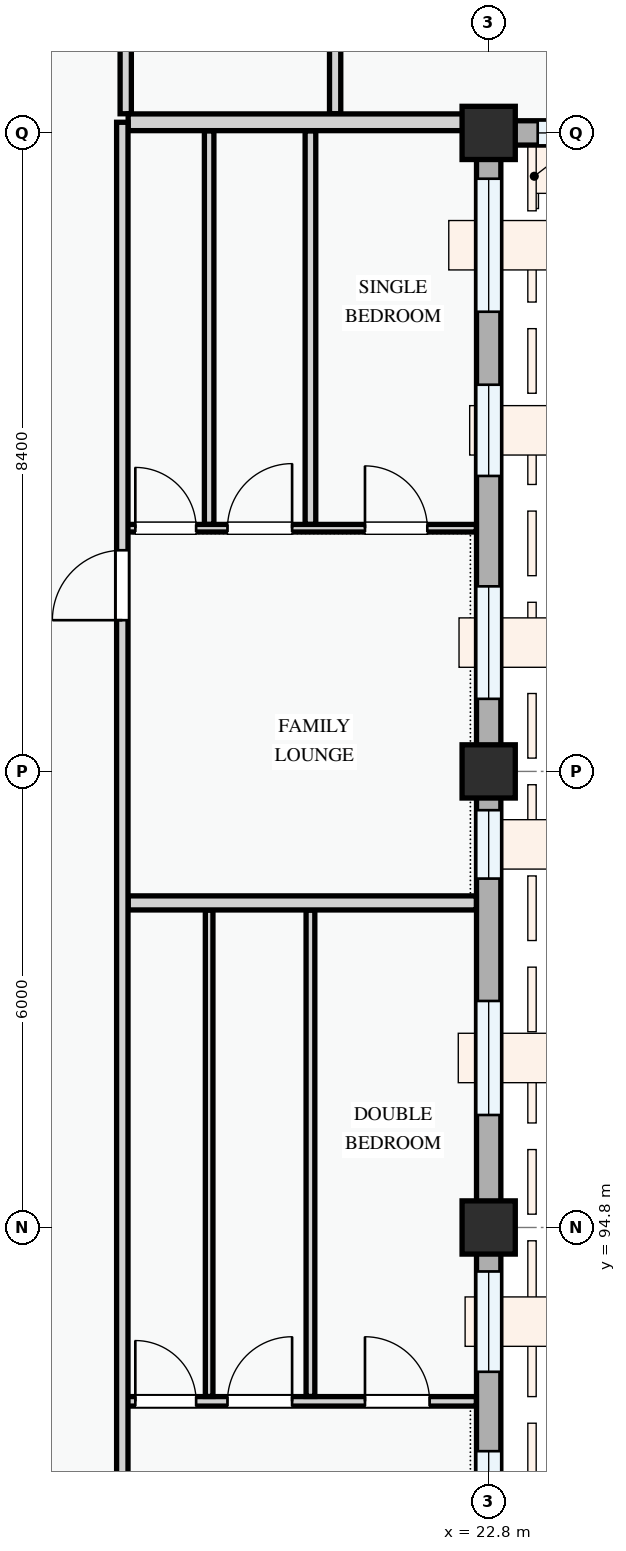
"""IFC4 building model, lengths in metres.
Left out: names, types, materials, properties, quantities, classifications, styles, units other than length and angle.
Written with IfcOpenShell. Run it as: python <this file> out.ifc"""

import sys

from ifc_helpers import new_model, si_unit, direction, frame, frame_2d, origin, origin_2d, place, context, subcontext, project, spatial, rectangle, extrude, element, fill, save


model = new_model("IFC4")
c1 = context("Model", 3, precision=1e-05, world=origin(), true_north=direction((0.0, 1.0)))
c2 = subcontext(c1, "Body", "Model", "MODEL_VIEW")
j1 = project(units=[si_unit("LENGTHUNIT", "METRE"), si_unit("PLANEANGLEUNIT", "RADIAN")], contexts=[c1])
p1 = place(None, origin())
s1 = spatial("IfcSite", under=j1, at=p1, CompositionType="ELEMENT")
p2 = place(p1, origin())
s2 = spatial("IfcBuilding", under=s1, at=p2, CompositionType="ELEMENT")
p3 = place(p2, frame((0.0, 0.0, 21.3)))
s3 = spatial("IfcBuildingStorey", under=s2, at=p3, CompositionType="ELEMENT", Elevation=21.3)
for number, where, z_axis, x_axis in (
    (1, (22.8, 94.8, 0.0), (0.0, 0.0, 1.0), (1.0, 0.0, 0.0)),
    (2, (22.8, 100.8, 0.0), (0.0, 0.0, 1.0), (1.0, 0.0, 0.0)),
    (3, (22.8, 109.2, 0.0), (0.0, 0.0, 1.0), (1.0, 0.0, 0.0)),
):
    element("IfcColumn", number, at=place(p3, frame(where, z_axis=z_axis, x_axis=x_axis)), inside=s3, PredefinedType="COLUMN", context=c2, shape_type="SweptSolid", body=[
        extrude(rectangle(XDim=0.7, YDim=0.7, at=origin_2d()), origin(), (0.0, 0.0, 1.0), 3.3),
    ])
p4 = place(p3, frame((22.8, 109.2, 0.0), z_axis=(0.0, 0.0, 1.0), x_axis=(1.0, 0.0, 0.0)))
e4 = element("IfcWall", 4, at=p4, inside=s3, PredefinedType="STANDARD", context=c2, shape_type="SweptSolid", body=[
    extrude(rectangle(XDim=6.0, YDim=0.32, at=frame_2d((3.0, 0.0))), origin(), (0.0, 0.0, 1.0), 2.475),
])
p5 = place(p4, frame((0.645, 0.0, 0.78)))
e5 = element("IfcOpeningElement", 5, at=p5, cuts=e4, PredefinedType="OPENING", context=c2, shape_type="SweptSolid", body=[
    extrude(rectangle(XDim=1.25, YDim=1.45, at=frame_2d((0.625, 0.725))), frame((0.0, 0.17, 0.0), z_axis=(0.0, -1.0, 0.0), x_axis=(1.0, 0.0, 0.0)), (0.0, 0.0, 1.0), 0.34),
])
p6 = place(p4, frame((3.42, 0.0, 0.78)))
e6 = element("IfcOpeningElement", 6, at=p6, cuts=e4, PredefinedType="OPENING", context=c2, shape_type="SweptSolid", body=[
    extrude(rectangle(XDim=1.32, YDim=1.35, at=frame_2d((0.66, 0.675))), frame((0.0, 0.17, 0.0), z_axis=(0.0, -1.0, 0.0), x_axis=(1.0, 0.0, 0.0)), (0.0, 0.0, 1.0), 0.34),
])
p7 = place(p3, frame((22.8, 86.4, 0.0), z_axis=(0.0, 0.0, 1.0), x_axis=(0.0, 1.0, 0.0)))
e7 = element("IfcWall", 7, at=p7, inside=s3, PredefinedType="STANDARD", context=c2, shape_type="SweptSolid", body=[
    extrude(rectangle(XDim=8.4, YDim=0.32, at=frame_2d((4.2, 0.0))), origin(), (0.0, 0.0, 1.0), 2.425),
])
p8 = place(p7, frame((1.016, 0.0, 0.78)))
e8 = element("IfcOpeningElement", 8, at=p8, cuts=e7, PredefinedType="OPENING", context=c2, shape_type="SweptSolid", body=[
    extrude(rectangle(XDim=1.38, YDim=1.48, at=frame_2d((0.69, 0.74))), frame((0.0, 0.17, 0.0), z_axis=(0.0, -1.0, 0.0), x_axis=(1.0, 0.0, 0.0)), (0.0, 0.0, 1.0), 0.34),
])
p9 = place(p7, frame((3.737, 0.0, 0.78)))
e9 = element("IfcOpeningElement", 9, at=p9, cuts=e7, PredefinedType="OPENING", context=c2, shape_type="SweptSolid", body=[
    extrude(rectangle(XDim=1.72, YDim=1.52, at=frame_2d((0.86, 0.76))), frame((0.0, 0.17, 0.0), z_axis=(0.0, -1.0, 0.0), x_axis=(1.0, 0.0, 0.0)), (0.0, 0.0, 1.0), 0.34),
])
p10 = place(p7, frame((6.501, 0.0, 0.78)))
e10 = element("IfcOpeningElement", 10, at=p10, cuts=e7, PredefinedType="OPENING", context=c2, shape_type="SweptSolid", body=[
    extrude(rectangle(XDim=1.32, YDim=1.35, at=frame_2d((0.66, 0.675))), frame((0.0, 0.17, 0.0), z_axis=(0.0, -1.0, 0.0), x_axis=(1.0, 0.0, 0.0)), (0.0, 0.0, 1.0), 0.34),
])
p11 = place(p3, frame((22.8, 94.8, 0.0), z_axis=(0.0, 0.0, 1.0), x_axis=(0.0, 1.0, 0.0)))
e11 = element("IfcWall", 11, at=p11, inside=s3, PredefinedType="STANDARD", context=c2, shape_type="SweptSolid", body=[
    extrude(rectangle(XDim=6.0, YDim=0.32, at=frame_2d((3.0, 0.0))), origin(), (0.0, 0.0, 1.0), 2.575),
])
p12 = place(p11, frame((1.48, 0.0, 0.78)))
e12 = element("IfcOpeningElement", 12, at=p12, cuts=e11, PredefinedType="OPENING", context=c2, shape_type="SweptSolid", body=[
    extrude(rectangle(XDim=1.5, YDim=1.5, at=frame_2d((0.75, 0.75))), frame((0.0, 0.17, 0.0), z_axis=(0.0, -1.0, 0.0), x_axis=(1.0, 0.0, 0.0)), (0.0, 0.0, 1.0), 0.34),
])
p13 = place(p11, frame((4.59, 0.0, 0.78)))
e13 = element("IfcOpeningElement", 13, at=p13, cuts=e11, PredefinedType="OPENING", context=c2, shape_type="SweptSolid", body=[
    extrude(rectangle(XDim=0.9, YDim=1.2, at=frame_2d((0.45, 0.6))), frame((0.0, 0.17, 0.0), z_axis=(0.0, -1.0, 0.0), x_axis=(1.0, 0.0, 0.0)), (0.0, 0.0, 1.0), 0.34),
])
p14 = place(p3, frame((22.8, 100.8, 0.0), z_axis=(0.0, 0.0, 1.0), x_axis=(0.0, 1.0, 0.0)))
e14 = element("IfcWall", 14, at=p14, inside=s3, PredefinedType="STANDARD", context=c2, shape_type="SweptSolid", body=[
    extrude(rectangle(XDim=8.4, YDim=0.32, at=frame_2d((4.2, 0.0))), origin(), (0.0, 0.0, 1.0), 2.425),
])
p15 = place(p14, frame((0.955, 0.0, 0.78)))
e15 = element("IfcOpeningElement", 15, at=p15, cuts=e14, PredefinedType="OPENING", context=c2, shape_type="SweptSolid", body=[
    extrude(rectangle(XDim=1.48, YDim=1.52, at=frame_2d((0.74, 0.76))), frame((0.0, 0.17, 0.0), z_axis=(0.0, -1.0, 0.0), x_axis=(1.0, 0.0, 0.0)), (0.0, 0.0, 1.0), 0.34),
])
p16 = place(p14, frame((3.887, 0.0, 0.78)))
e16 = element("IfcOpeningElement", 16, at=p16, cuts=e14, PredefinedType="OPENING", context=c2, shape_type="SweptSolid", body=[
    extrude(rectangle(XDim=1.2, YDim=1.35, at=frame_2d((0.6, 0.675))), frame((0.0, 0.17, 0.0), z_axis=(0.0, -1.0, 0.0), x_axis=(1.0, 0.0, 0.0)), (0.0, 0.0, 1.0), 0.34),
])
p17 = place(p14, frame((6.047, 0.0, 0.78)))
e17 = element("IfcOpeningElement", 17, at=p17, cuts=e14, PredefinedType="OPENING", context=c2, shape_type="SweptSolid", body=[
    extrude(rectangle(XDim=1.75, YDim=1.45, at=frame_2d((0.875, 0.725))), frame((0.0, 0.17, 0.0), z_axis=(0.0, -1.0, 0.0), x_axis=(1.0, 0.0, 0.0)), (0.0, 0.0, 1.0), 0.34),
])
for number, where, z_axis, x_axis in (
    (18, (18.025, 113.324, 0.0), (0.0, 0.0, 1.0), (0.0, -1.0, 0.0)),
    (19, (20.78, 113.324, 0.0), (0.0, 0.0, 1.0), (0.0, -1.0, 0.0)),
):
    element("IfcWall", number, at=place(p3, frame(where, z_axis=z_axis, x_axis=x_axis)), inside=s3, PredefinedType="PARTITIONING", context=c2, shape_type="SweptSolid", body=[
        extrude(rectangle(XDim=3.872, YDim=0.148, at=frame_2d((1.936, 0.0))), origin(), (0.0, 0.0, 1.0), 3.0),
    ])
p18 = place(p3, frame((17.98, 92.513, 0.0), z_axis=(0.0, 0.0, 1.0), x_axis=(1.0, 0.0, 0.0)))
e20 = element("IfcWall", 20, at=p18, inside=s3, PredefinedType="PARTITIONING", context=c2, shape_type="SweptSolid", body=[
    extrude(rectangle(XDim=4.658, YDim=0.125, at=frame_2d((2.329, 0.0))), origin(), (0.0, 0.0, 1.0), 3.0),
])
p19 = place(p18, frame((0.171, 0.0, 0.0)))
e21 = element("IfcOpeningElement", 21, at=p19, cuts=e20, PredefinedType="OPENING", context=c2, shape_type="SweptSolid", body=[
    extrude(rectangle(XDim=0.8, YDim=2.1, at=frame_2d((0.4, 1.05))), frame((0.0, 0.073, 0.0), z_axis=(0.0, -1.0, 0.0), x_axis=(1.0, 0.0, 0.0)), (0.0, 0.0, 1.0), 0.145),
])
p20 = place(p18, frame((1.384, 0.0, 0.0)))
e22 = element("IfcOpeningElement", 22, at=p20, cuts=e20, PredefinedType="OPENING", context=c2, shape_type="SweptSolid", body=[
    extrude(rectangle(XDim=0.85, YDim=2.1, at=frame_2d((0.425, 1.05))), frame((0.0, 0.073, 0.0), z_axis=(0.0, -1.0, 0.0), x_axis=(1.0, 0.0, 0.0)), (0.0, 0.0, 1.0), 0.145),
])
p21 = place(p18, frame((3.193, 0.0, 0.0)))
e23 = element("IfcOpeningElement", 23, at=p21, cuts=e20, PredefinedType="OPENING", context=c2, shape_type="SweptSolid", body=[
    extrude(rectangle(XDim=0.85, YDim=2.1, at=frame_2d((0.425, 1.05))), frame((0.0, 0.073, 0.0), z_axis=(0.0, -1.0, 0.0), x_axis=(1.0, 0.0, 0.0)), (0.0, 0.0, 1.0), 0.145),
])
p22 = place(p3, frame((20.455, 92.577, 0.0), z_axis=(0.0, 0.0, 1.0), x_axis=(0.0, 1.0, 0.0)))
e24 = element("IfcWall", 24, at=p22, inside=s3, PredefinedType="PARTITIONING", context=c2, shape_type="SweptSolid", body=[
    extrude(rectangle(XDim=6.398, YDim=0.115, at=frame_2d((3.199, 0.0))), origin(), (0.0, 0.0, 1.0), 3.0),
])
p23 = place(p3, frame((19.122, 92.577, 0.0), z_axis=(0.0, 0.0, 1.0), x_axis=(0.0, 1.0, 0.0)))
e25 = element("IfcWall", 25, at=p23, inside=s3, PredefinedType="PARTITIONING", context=c2, shape_type="SweptSolid", body=[
    extrude(rectangle(XDim=6.398, YDim=0.1, at=frame_2d((3.199, 0.0))), origin(), (0.0, 0.0, 1.0), 3.0),
])
p24 = place(p3, frame((17.98, 104.0, 0.0), z_axis=(0.0, 0.0, 1.0), x_axis=(1.0, 0.0, 0.0)))
e26 = element("IfcWall", 26, at=p24, inside=s3, PredefinedType="PARTITIONING", context=c2, shape_type="SweptSolid", body=[
    extrude(rectangle(XDim=4.658, YDim=0.1, at=frame_2d((2.329, 0.0))), origin(), (0.0, 0.0, 1.0), 3.0),
])
p25 = place(p24, frame((0.171, 0.0, 0.0)))
e27 = element("IfcOpeningElement", 27, at=p25, cuts=e26, PredefinedType="OPENING", context=c2, shape_type="SweptSolid", body=[
    extrude(rectangle(XDim=0.8, YDim=2.1, at=frame_2d((0.4, 1.05))), frame((0.0, 0.06, 0.0), z_axis=(0.0, -1.0, 0.0), x_axis=(1.0, 0.0, 0.0)), (0.0, 0.0, 1.0), 0.12),
])
p26 = place(p24, frame((1.384, 0.0, 0.0)))
e28 = element("IfcOpeningElement", 28, at=p26, cuts=e26, PredefinedType="OPENING", context=c2, shape_type="SweptSolid", body=[
    extrude(rectangle(XDim=0.85, YDim=2.1, at=frame_2d((0.425, 1.05))), frame((0.0, 0.06, 0.0), z_axis=(0.0, -1.0, 0.0), x_axis=(1.0, 0.0, 0.0)), (0.0, 0.0, 1.0), 0.12),
])
p27 = place(p24, frame((3.193, 0.0, 0.0)))
e29 = element("IfcOpeningElement", 29, at=p27, cuts=e26, PredefinedType="OPENING", context=c2, shape_type="SweptSolid", body=[
    extrude(rectangle(XDim=0.82, YDim=2.08, at=frame_2d((0.41, 1.04))), frame((0.0, 0.06, 0.0), z_axis=(0.0, -1.0, 0.0), x_axis=(1.0, 0.0, 0.0)), (0.0, 0.0, 1.0), 0.12),
])
p28 = place(p3, frame((20.455, 104.052, 0.0), z_axis=(0.0, 0.0, 1.0), x_axis=(0.0, 1.0, 0.0)))
e30 = element("IfcWall", 30, at=p28, inside=s3, PredefinedType="PARTITIONING", context=c2, shape_type="SweptSolid", body=[
    extrude(rectangle(XDim=5.177, YDim=0.14, at=frame_2d((2.588, 0.0))), origin(), (0.0, 0.0, 1.0), 3.0),
])
p29 = place(p3, frame((19.122, 104.052, 0.0), z_axis=(0.0, 0.0, 1.0), x_axis=(0.0, 1.0, 0.0)))
e31 = element("IfcWall", 31, at=p29, inside=s3, PredefinedType="PARTITIONING", context=c2, shape_type="SweptSolid", body=[
    extrude(rectangle(XDim=5.177, YDim=0.125, at=frame_2d((2.588, 0.0))), origin(), (0.0, 0.0, 1.0), 3.0),
])
p30 = place(p3, frame((18.057, 99.07, 0.0), z_axis=(0.0, 0.0, 1.0), x_axis=(1.0, 0.0, 0.0)))
e32 = element("IfcWall", 32, at=p30, inside=s3, PredefinedType="PARTITIONING", context=c2, shape_type="SweptSolid", body=[
    extrude(rectangle(XDim=4.581, YDim=0.185, at=frame_2d((2.291, 0.0))), origin(), (0.0, 0.0, 1.0), 3.0),
])
p31 = place(p3, frame((18.057, 109.34, 0.0), z_axis=(0.0, 0.0, 1.0), x_axis=(1.0, 0.0, 0.0)))
e33 = element("IfcWall", 33, at=p31, inside=s3, PredefinedType="PARTITIONING", context=c2, shape_type="SweptSolid", body=[
    extrude(rectangle(XDim=4.683, YDim=0.22, at=frame_2d((2.342, 0.0))), origin(), (0.0, 0.0, 1.0), 2.375),
])
p32 = place(p3, frame((17.98, 86.562, 0.0), z_axis=(0.0, 0.0, 1.0), x_axis=(0.0, 1.0, 0.0)))
e34 = element("IfcWall", 34, at=p32, inside=s3, PredefinedType="PARTITIONING", context=c2, shape_type="SweptSolid", body=[
    extrude(rectangle(XDim=22.778, YDim=0.15, at=frame_2d((11.389, 0.0))), origin(), (0.0, 0.0, 1.0), 3.0),
])
p33 = place(p32, frame((3.593, 0.0, 0.0)))
e35 = element("IfcOpeningElement", 35, at=p33, cuts=e34, PredefinedType="OPENING", context=c2, shape_type="SweptSolid", body=[
    extrude(rectangle(XDim=0.92, YDim=2.1, at=frame_2d((0.46, 1.05))), frame((0.0, 0.085, 0.0), z_axis=(0.0, -1.0, 0.0), x_axis=(1.0, 0.0, 0.0)), (0.0, 0.0, 1.0), 0.17),
])
p34 = place(p32, frame((16.228, 0.0, 0.0)))
e36 = element("IfcOpeningElement", 36, at=p34, cuts=e34, PredefinedType="OPENING", context=c2, shape_type="SweptSolid", body=[
    extrude(rectangle(XDim=0.92, YDim=2.1, at=frame_2d((0.46, 1.05))), frame((0.0, 0.085, 0.0), z_axis=(0.0, -1.0, 0.0), x_axis=(1.0, 0.0, 0.0)), (0.0, 0.0, 1.0), 0.17),
])
p35 = place(p5, origin())
e37 = element("IfcWindow", 37, at=p35, inside=s3, PartitioningType="SINGLE_PANEL", PredefinedType="WINDOW", context=c2, shape_type="SweptSolid", body=[
    extrude(rectangle(XDim=1.25, YDim=1.45, at=frame_2d((0.625, 0.725))), frame((0.0, 0.03, 0.0), z_axis=(0.0, -1.0, 0.0), x_axis=(1.0, 0.0, 0.0)), (0.0, 0.0, 1.0), 0.06),
])
fill(e5, e37)
p36 = place(p9, origin())
e38 = element("IfcWindow", 38, at=p36, inside=s3, PartitioningType="DOUBLE_PANEL_VERTICAL", PredefinedType="WINDOW", context=c2, shape_type="SweptSolid", body=[
    extrude(rectangle(XDim=1.72, YDim=1.52, at=frame_2d((0.86, 0.76))), frame((0.0, 0.03, 0.0), z_axis=(0.0, -1.0, 0.0), x_axis=(1.0, 0.0, 0.0)), (0.0, 0.0, 1.0), 0.06),
])
fill(e9, e38)
p37 = place(p10, origin())
e39 = element("IfcWindow", 39, at=p37, inside=s3, PartitioningType="SINGLE_PANEL", PredefinedType="WINDOW", context=c2, shape_type="SweptSolid", body=[
    extrude(rectangle(XDim=1.32, YDim=1.35, at=frame_2d((0.66, 0.675))), frame((0.0, 0.03, 0.0), z_axis=(0.0, -1.0, 0.0), x_axis=(1.0, 0.0, 0.0)), (0.0, 0.0, 1.0), 0.06),
])
fill(e10, e39)
p38 = place(p12, origin())
e40 = element("IfcWindow", 40, at=p38, inside=s3, PartitioningType="SINGLE_PANEL", PredefinedType="WINDOW", context=c2, shape_type="SweptSolid", body=[
    extrude(rectangle(XDim=1.5, YDim=1.5, at=frame_2d((0.75, 0.75))), frame((0.0, 0.03, 0.0), z_axis=(0.0, -1.0, 0.0), x_axis=(1.0, 0.0, 0.0)), (0.0, 0.0, 1.0), 0.06),
])
fill(e12, e40)
p39 = place(p13, origin())
e41 = element("IfcWindow", 41, at=p39, inside=s3, PartitioningType="SINGLE_PANEL", PredefinedType="WINDOW", context=c2, shape_type="SweptSolid", body=[
    extrude(rectangle(XDim=0.9, YDim=1.2, at=frame_2d((0.45, 0.6))), frame((0.0, 0.03, 0.0), z_axis=(0.0, -1.0, 0.0), x_axis=(1.0, 0.0, 0.0)), (0.0, 0.0, 1.0), 0.06),
])
fill(e13, e41)
p40 = place(p15, origin())
e42 = element("IfcWindow", 42, at=p40, inside=s3, PartitioningType="SINGLE_PANEL", PredefinedType="WINDOW", context=c2, shape_type="SweptSolid", body=[
    extrude(rectangle(XDim=1.48, YDim=1.52, at=frame_2d((0.74, 0.76))), frame((0.0, 0.03, 0.0), z_axis=(0.0, -1.0, 0.0), x_axis=(1.0, 0.0, 0.0)), (0.0, 0.0, 1.0), 0.06),
])
fill(e15, e42)
p41 = place(p16, origin())
e43 = element("IfcWindow", 43, at=p41, inside=s3, PartitioningType="SINGLE_PANEL", PredefinedType="WINDOW", context=c2, shape_type="SweptSolid", body=[
    extrude(rectangle(XDim=1.2, YDim=1.35, at=frame_2d((0.6, 0.675))), frame((0.0, 0.03, 0.0), z_axis=(0.0, -1.0, 0.0), x_axis=(1.0, 0.0, 0.0)), (0.0, 0.0, 1.0), 0.06),
])
fill(e16, e43)
p42 = place(p17, origin())
e44 = element("IfcWindow", 44, at=p42, inside=s3, PartitioningType="DOUBLE_PANEL_VERTICAL", PredefinedType="WINDOW", context=c2, shape_type="SweptSolid", body=[
    extrude(rectangle(XDim=1.75, YDim=1.45, at=frame_2d((0.875, 0.725))), frame((0.0, 0.03, 0.0), z_axis=(0.0, -1.0, 0.0), x_axis=(1.0, 0.0, 0.0)), (0.0, 0.0, 1.0), 0.06),
])
fill(e17, e44)
p43 = place(p19, origin())
e45 = element("IfcDoor", 45, at=p43, inside=s3, OperationType="SINGLE_SWING_LEFT", PredefinedType="DOOR", context=c2, shape_type="SweptSolid", body=[
    extrude(rectangle(XDim=0.8, YDim=2.1, at=frame_2d((0.4, 1.05))), frame((0.0, 0.025, 0.0), z_axis=(0.0, -1.0, 0.0), x_axis=(1.0, 0.0, 0.0)), (0.0, 0.0, 1.0), 0.05),
])
fill(e21, e45)
p44 = place(p20, origin())
e46 = element("IfcDoor", 46, at=p44, inside=s3, OperationType="SINGLE_SWING_RIGHT", PredefinedType="DOOR", context=c2, shape_type="SweptSolid", body=[
    extrude(rectangle(XDim=0.85, YDim=2.1, at=frame_2d((0.425, 1.05))), frame((0.0, 0.025, 0.0), z_axis=(0.0, -1.0, 0.0), x_axis=(1.0, 0.0, 0.0)), (0.0, 0.0, 1.0), 0.05),
])
fill(e22, e46)
p45 = place(p21, origin())
e47 = element("IfcDoor", 47, at=p45, inside=s3, OperationType="SINGLE_SWING_LEFT", PredefinedType="DOOR", context=c2, shape_type="SweptSolid", body=[
    extrude(rectangle(XDim=0.85, YDim=2.1, at=frame_2d((0.425, 1.05))), frame((0.0, 0.025, 0.0), z_axis=(0.0, -1.0, 0.0), x_axis=(1.0, 0.0, 0.0)), (0.0, 0.0, 1.0), 0.05),
])
fill(e23, e47)
p46 = place(p25, origin())
e48 = element("IfcDoor", 48, at=p46, inside=s3, OperationType="SINGLE_SWING_LEFT", PredefinedType="DOOR", context=c2, shape_type="SweptSolid", body=[
    extrude(rectangle(XDim=0.8, YDim=2.1, at=frame_2d((0.4, 1.05))), frame((0.0, 0.025, 0.0), z_axis=(0.0, -1.0, 0.0), x_axis=(1.0, 0.0, 0.0)), (0.0, 0.0, 1.0), 0.05),
])
fill(e27, e48)
p47 = place(p26, origin())
e49 = element("IfcDoor", 49, at=p47, inside=s3, OperationType="SINGLE_SWING_RIGHT", PredefinedType="DOOR", context=c2, shape_type="SweptSolid", body=[
    extrude(rectangle(XDim=0.85, YDim=2.1, at=frame_2d((0.425, 1.05))), frame((0.0, 0.025, 0.0), z_axis=(0.0, -1.0, 0.0), x_axis=(1.0, 0.0, 0.0)), (0.0, 0.0, 1.0), 0.05),
])
fill(e28, e49)
p48 = place(p27, origin())
e50 = element("IfcDoor", 50, at=p48, inside=s3, OperationType="SINGLE_SWING_LEFT", PredefinedType="DOOR", context=c2, shape_type="SweptSolid", body=[
    extrude(rectangle(XDim=0.82, YDim=2.08, at=frame_2d((0.41, 1.04))), frame((0.0, 0.025, 0.0), z_axis=(0.0, -1.0, 0.0), x_axis=(1.0, 0.0, 0.0)), (0.0, 0.0, 1.0), 0.05),
])
fill(e29, e50)
p49 = place(p34, origin())
e51 = element("IfcDoor", 51, at=p49, inside=s3, OperationType="SINGLE_SWING_LEFT", PredefinedType="DOOR", context=c2, shape_type="SweptSolid", body=[
    extrude(rectangle(XDim=0.92, YDim=2.1, at=frame_2d((0.46, 1.05))), frame((0.0, 0.025, 0.0), z_axis=(0.0, -1.0, 0.0), x_axis=(1.0, 0.0, 0.0)), (0.0, 0.0, 1.0), 0.05),
])
fill(e36, e51)
save(model, sys.argv[1])
